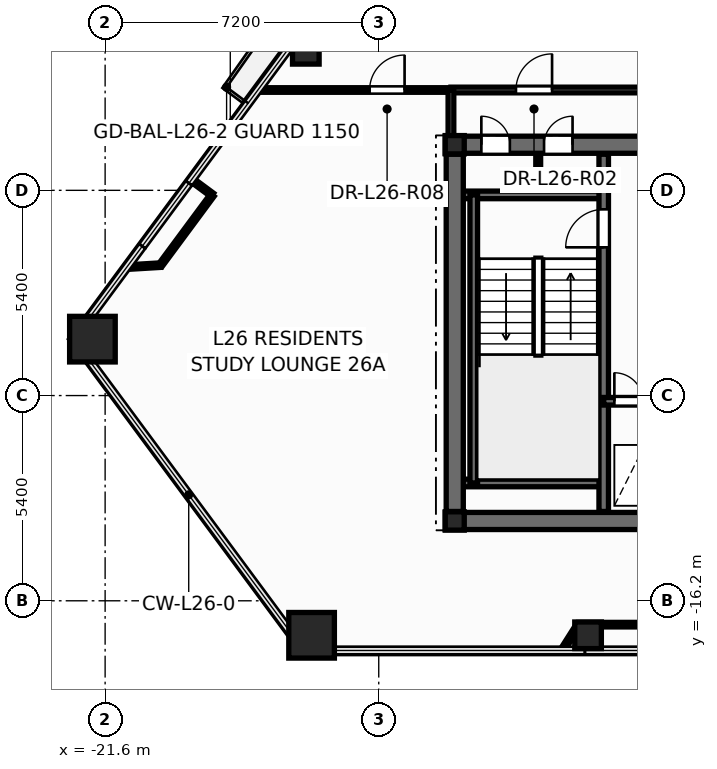
"""IFC4 building model, lengths in metres.
Left out: names, types, materials, properties, quantities, classifications, styles, units other than length and angle.
Written with IfcOpenShell. Run it as: python <this file> out.ifc"""

import sys

from ifc_helpers import new_model, si_unit, direction, frame, frame_2d, origin, origin_2d, place, context, subcontext, project, spatial, rectangle, hollow_rectangle, hollow_circle, i_section, extrude, element, fill, save


model = new_model("IFC4")
c1 = context("Model", 3, precision=1e-05, world=origin(), true_north=direction((0.0, 1.0)))
c2 = subcontext(c1, "Body", "Model", "MODEL_VIEW")
j1 = project(units=[si_unit("LENGTHUNIT", "METRE"), si_unit("PLANEANGLEUNIT", "RADIAN")], contexts=[c1])
p1 = place(None, origin())
s1 = spatial("IfcSite", under=j1, at=p1, CompositionType="ELEMENT")
p2 = place(p1, origin())
s2 = spatial("IfcBuilding", under=s1, at=p2, CompositionType="ELEMENT")
p3 = place(p2, frame((0.0, 0.0, 103.2)))
s3 = spatial("IfcBuildingStorey", under=s2, at=p3, CompositionType="ELEMENT", Elevation=103.2)
for number, where, z_axis, x_axis in (
    (1, (-21.934, -9.316, 0.0), (0.0, 0.0, 1.0), (1.0, 0.0, 0.0)),
    (2, (-16.167, -17.108, 0.0), (0.0, 0.0, 1.0), (1.0, 0.0, 0.0)),
):
    element("IfcColumn", number, at=place(p3, frame(where, z_axis=z_axis, x_axis=x_axis)), inside=s3, PredefinedType="COLUMN", context=c2, shape_type="SweptSolid", body=[
        extrude(hollow_rectangle(XDim=1.2, YDim=1.2, WallThickness=0.055, at=origin_2d()), origin(), (0.0, 0.0, 1.0), 3.6),
    ])
for number, where, z_axis, x_axis in (
    (3, (-8.892, -17.108, 0.0), (0.0, 0.0, 1.0), (1.0, 0.0, 0.0)),
    (4, (-16.319, -1.729, 0.0), (0.0, 0.0, 1.0), (1.0, 0.0, 0.0)),
):
    element("IfcColumn", number, at=place(p3, frame(where, z_axis=z_axis, x_axis=x_axis)), inside=s3, PredefinedType="COLUMN", context=c2, shape_type="SweptSolid", body=[
        extrude(hollow_circle(Radius=0.35, WallThickness=0.03, at=origin_2d()), origin(), (0.0, 0.0, 1.0), 3.6),
    ])
for number, where, z_axis, x_axis in (
    (5, (-12.4, -14.1, 0.0), (0.0, 0.0, 1.0), (1.0, 0.0, 0.0)),
    (6, (-12.4, -4.2, 0.0), (0.0, 0.0, 1.0), (1.0, 0.0, 0.0)),
):
    element("IfcColumn", number, at=place(p3, frame(where, z_axis=z_axis, x_axis=x_axis)), inside=s3, PredefinedType="COLUMN", context=c2, shape_type="SweptSolid", body=[
        extrude(i_section(OverallWidth=0.5, OverallDepth=0.482, WebThickness=0.04, FlangeThickness=0.045, at=origin_2d()), origin(), (0.0, 0.0, 1.0), 3.6),
    ])
p4 = place(p3, frame((-10.2, -5.52, 0.0), z_axis=(0.0, 0.0, 1.0), x_axis=(0.0, 1.0, 0.0)))
e7 = element("IfcWall", 7, at=p4, inside=s3, PredefinedType="PARTITIONING", context=c2, shape_type="SweptSolid", body=[
    extrude(rectangle(XDim=1.12, YDim=0.12, at=frame_2d((0.56, 0.0))), origin(), (0.0, 0.0, 1.0), 3.35),
])
p5 = place(p3, frame((-12.65, -14.1, 0.0), z_axis=(0.0, 0.0, 1.0), x_axis=(1.0, 0.0, 0.0)))
e8 = element("IfcWall", 8, at=p5, inside=s3, PredefinedType="SHEAR", context=c2, shape_type="SweptSolid", body=[
    extrude(rectangle(XDim=25.3, YDim=0.45, at=frame_2d((12.65, 0.0))), origin(), (0.0, 0.0, 1.0), 3.6),
])
p6 = place(p3, frame((-12.65, -4.2, 0.0), z_axis=(0.0, 0.0, 1.0), x_axis=(1.0, 0.0, 0.0)))
e9 = element("IfcWall", 9, at=p6, inside=s3, PredefinedType="SHEAR", context=c2, shape_type="SweptSolid", body=[
    extrude(rectangle(XDim=25.3, YDim=0.45, at=frame_2d((12.65, 0.0))), origin(), (0.0, 0.0, 1.0), 3.6),
])
p7 = place(p6, frame((0.95, 0.0, 0.0)))
e10 = element("IfcOpeningElement", 10, at=p7, cuts=e9, PredefinedType="OPENING", context=c2, shape_type="SweptSolid", body=[
    extrude(rectangle(XDim=0.756, YDim=2.054, at=frame_2d((0.375, 1.027))), frame((0.0, 0.235, 0.0), z_axis=(0.0, -1.0, 0.0), x_axis=(1.0, 0.0, 0.0)), (0.0, 0.0, 1.0), 0.47),
])
p8 = place(p6, frame((2.6, 0.0, 0.0)))
e11 = element("IfcOpeningElement", 11, at=p8, cuts=e9, PredefinedType="OPENING", context=c2, shape_type="SweptSolid", body=[
    extrude(rectangle(XDim=0.756, YDim=2.054, at=frame_2d((0.375, 1.027))), frame((0.0, 0.235, 0.0), z_axis=(0.0, -1.0, 0.0), x_axis=(1.0, 0.0, 0.0)), (0.0, 0.0, 1.0), 0.47),
])
p9 = place(p6, frame((21.85, 0.0, 0.0)))
e12 = element("IfcOpeningElement", 12, at=p9, cuts=e9, PredefinedType="OPENING", context=c2, shape_type="SweptSolid", body=[
    extrude(rectangle(XDim=0.756, YDim=2.054, at=frame_2d((0.375, 1.027))), frame((0.0, 0.235, 0.0), z_axis=(0.0, -1.0, 0.0), x_axis=(1.0, 0.0, 0.0)), (0.0, 0.0, 1.0), 0.47),
])
p10 = place(p6, frame((23.5, 0.0, 0.0)))
e13 = element("IfcOpeningElement", 13, at=p10, cuts=e9, PredefinedType="OPENING", context=c2, shape_type="SweptSolid", body=[
    extrude(rectangle(XDim=0.756, YDim=2.054, at=frame_2d((0.375, 1.027))), frame((0.0, 0.235, 0.0), z_axis=(0.0, -1.0, 0.0), x_axis=(1.0, 0.0, 0.0)), (0.0, 0.0, 1.0), 0.47),
])
p11 = place(p6, frame((5.85, 0.0, 0.0)))
e14 = element("IfcOpeningElement", 14, at=p11, cuts=e9, PredefinedType="OPENING", context=c2, shape_type="SweptSolid", body=[
    extrude(rectangle(XDim=1.006, YDim=2.104, at=frame_2d((0.5, 1.052))), frame((0.0, 0.235, 0.0), z_axis=(0.0, -1.0, 0.0), x_axis=(1.0, 0.0, 0.0)), (0.0, 0.0, 1.0), 0.47),
])
p12 = place(p6, frame((10.35, 0.0, 0.0)))
e15 = element("IfcOpeningElement", 15, at=p12, cuts=e9, PredefinedType="OPENING", context=c2, shape_type="SweptSolid", body=[
    extrude(rectangle(XDim=1.406, YDim=2.154, at=frame_2d((0.7, 1.077))), frame((0.0, 0.235, 0.0), z_axis=(0.0, -1.0, 0.0), x_axis=(1.0, 0.0, 0.0)), (0.0, 0.0, 1.0), 0.47),
])
p13 = place(p6, frame((18.45, 0.0, 0.0)))
e16 = element("IfcOpeningElement", 16, at=p13, cuts=e9, PredefinedType="OPENING", context=c2, shape_type="SweptSolid", body=[
    extrude(rectangle(XDim=1.006, YDim=2.104, at=frame_2d((0.5, 1.052))), frame((0.0, 0.235, 0.0), z_axis=(0.0, -1.0, 0.0), x_axis=(1.0, 0.0, 0.0)), (0.0, 0.0, 1.0), 0.47),
])
for number, where, z_axis, x_axis in (
    (17, (-12.35, -5.52, 0.0), (0.0, 0.0, 1.0), (1.0, 0.0, 0.0)),
    (18, (-12.35, -13.1, 0.0), (0.0, 0.0, 1.0), (1.0, 0.0, 0.0)),
):
    element("IfcWall", number, at=place(p3, frame(where, z_axis=z_axis, x_axis=x_axis)), inside=s3, PredefinedType="SOLIDWALL", context=c2, shape_type="SweptSolid", body=[
        extrude(rectangle(XDim=3.87, YDim=0.2, at=frame_2d((1.935, 0.0))), origin(), (0.0, 0.0, 1.0), 3.6),
    ])
p14 = place(p3, frame((-11.9, -13.1, 0.0), z_axis=(0.0, 0.0, 1.0), x_axis=(0.0, 1.0, 0.0)))
e19 = element("IfcWall", 19, at=p14, inside=s3, PredefinedType="SOLIDWALL", context=c2, shape_type="SweptSolid", body=[
    extrude(rectangle(XDim=7.58, YDim=0.2, at=frame_2d((3.79, 0.0))), origin(), (0.0, 0.0, 1.0), 3.6),
])
p15 = place(p3, frame((-8.48, -13.85, 0.0), z_axis=(0.0, 0.0, 1.0), x_axis=(0.0, 1.0, 0.0)))
e20 = element("IfcWall", 20, at=p15, inside=s3, PredefinedType="SHEAR", context=c2, shape_type="SweptSolid", body=[
    extrude(rectangle(XDim=9.4, YDim=0.25, at=frame_2d((4.7, 0.0))), origin(), (0.0, 0.0, 1.0), 3.6),
])
p16 = place(p15, frame((6.95, 0.0, 0.0)))
e21 = element("IfcOpeningElement", 21, at=p16, cuts=e20, PredefinedType="OPENING", context=c2, shape_type="SweptSolid", body=[
    extrude(rectangle(XDim=1.006, YDim=2.104, at=frame_2d((0.5, 1.052))), frame((0.0, 0.135, 0.0), z_axis=(0.0, -1.0, 0.0), x_axis=(1.0, 0.0, 0.0)), (0.0, 0.0, 1.0), 0.27),
])
p17 = place(p3, frame((-8.48, -10.95, 0.0), z_axis=(0.0, 0.0, 1.0), x_axis=(1.0, 0.0, 0.0)))
e22 = element("IfcWall", 22, at=p17, inside=s3, PredefinedType="SOLIDWALL", context=c2, shape_type="SweptSolid", body=[
    extrude(rectangle(XDim=3.36, YDim=0.2, at=frame_2d((1.68, 0.0))), origin(), (0.0, 0.0, 1.0), 3.6),
])
p18 = place(p17, frame((0.28, 0.0, 0.0)))
e23 = element("IfcOpeningElement", 23, at=p18, cuts=e22, PredefinedType="OPENING", context=c2, shape_type="SweptSolid", body=[
    extrude(rectangle(XDim=0.756, YDim=2.054, at=frame_2d((0.375, 1.027))), frame((0.0, 0.11, 0.0), z_axis=(0.0, -1.0, 0.0), x_axis=(1.0, 0.0, 0.0)), (0.0, 0.0, 1.0), 0.22),
])
p19 = place(p17, frame((1.85, 0.0, 0.0)))
e24 = element("IfcOpeningElement", 24, at=p19, cuts=e22, PredefinedType="OPENING", context=c2, shape_type="SweptSolid", body=[
    extrude(rectangle(XDim=1.106, YDim=2.104, at=frame_2d((0.55, 1.052))), frame((0.0, 0.11, 0.0), z_axis=(0.0, -1.0, 0.0), x_axis=(1.0, 0.0, 0.0)), (0.0, 0.0, 1.0), 0.22),
])
p20 = place(p3, frame((-12.4, -13.85, 0.0), z_axis=(0.0, 0.0, 1.0), x_axis=(0.0, 1.0, 0.0)))
e25 = element("IfcWall", 25, at=p20, inside=s3, PredefinedType="SHEAR", context=c2, shape_type="SweptSolid", body=[
    extrude(rectangle(XDim=9.4, YDim=0.45, at=frame_2d((4.7, 0.0))), origin(), (0.0, 0.0, 1.0), 3.6),
])
p21 = place(p3, frame((-12.5, -2.76, 0.0), z_axis=(0.0, 0.0, 1.0), x_axis=(1.0, 0.0, 0.0)))
e26 = element("IfcWall", 26, at=p21, inside=s3, PredefinedType="PARTITIONING", context=c2, shape_type="SweptSolid", body=[
    extrude(rectangle(XDim=6.238, YDim=0.15, at=frame_2d((3.119, 0.0))), origin(), (0.0, 0.0, 1.0), 2.325),
])
p22 = place(p21, frame((1.711, 0.0, 0.0)))
e27 = element("IfcOpeningElement", 27, at=p22, cuts=e26, PredefinedType="OPENING", context=c2, shape_type="SweptSolid", body=[
    extrude(rectangle(XDim=0.956, YDim=2.104, at=frame_2d((0.475, 1.052))), frame((0.0, 0.085, 0.0), z_axis=(0.0, -1.0, 0.0), x_axis=(1.0, 0.0, 0.0)), (0.0, 0.0, 1.0), 0.17),
])
p23 = place(p3, frame((-17.58, -2.76, 0.0), z_axis=(0.0, 0.0, 1.0), x_axis=(1.0, 0.0, 0.0)))
e28 = element("IfcWall", 28, at=p23, inside=s3, PredefinedType="PARTITIONING", context=c2, shape_type="SweptSolid", body=[
    extrude(rectangle(XDim=5.14, YDim=0.12, at=frame_2d((2.57, 0.0))), origin(), (0.0, 0.0, 1.0), 2.713),
])
p24 = place(p23, frame((2.94, 0.0, 0.0)))
e29 = element("IfcOpeningElement", 29, at=p24, cuts=e28, PredefinedType="OPENING", context=c2, shape_type="SweptSolid", body=[
    extrude(rectangle(XDim=0.926, YDim=2.104, at=frame_2d((0.46, 1.052))), frame((0.0, 0.07, 0.0), z_axis=(0.0, -1.0, 0.0), x_axis=(1.0, 0.0, 0.0)), (0.0, 0.0, 1.0), 0.14),
])
p25 = place(p3, frame((-9.141, -16.828, 0.0), z_axis=(0.0, 0.0, 1.0), x_axis=(1.0, 0.0, 0.0)))
e30 = element("IfcWall", 30, at=p25, inside=s3, PredefinedType="PARTITIONING", context=c2, shape_type="SweptSolid", body=[
    extrude(rectangle(XDim=3.569, YDim=0.12, at=frame_2d((1.784, 0.0))), origin(), (0.0, 0.0, 1.0), 2.713),
])
p26 = place(p3, frame((-18.779, -5.524, 0.0), z_axis=(0.0, 0.0, 1.0), x_axis=(-0.594914508596, -0.803788981924, 0.0)))
e31 = element("IfcWall", 31, at=p26, inside=s3, PredefinedType="PARTITIONING", context=c2, shape_type="SweptSolid", body=[
    extrude(rectangle(XDim=2.294, YDim=0.12, at=frame_2d((1.147, 0.0))), origin(), (0.0, 0.0, 1.0), 3.35),
])
p27 = place(p3, frame((-12.5, -4.24, 0.0), z_axis=(0.0, 0.0, 1.0), x_axis=(0.0, 1.0, 0.0)))
e32 = element("IfcWall", 32, at=p27, inside=s3, PredefinedType="PARTITIONING", context=c2, shape_type="SweptSolid", body=[
    extrude(rectangle(XDim=1.48, YDim=0.15, at=frame_2d((0.74, 0.0))), origin(), (0.0, 0.0, 1.0), 2.325),
])
p28 = place(p3, frame((-20.144, -7.368, 0.0), z_axis=(0.0, 0.0, 1.0), x_axis=(-0.998195482696, -0.060048133402, 0.0)))
e33 = element("IfcWall", 33, at=p28, inside=s3, PredefinedType="PARTITIONING", context=c2, shape_type="SweptSolid", body=[
    extrude(rectangle(XDim=0.874, YDim=0.12, at=frame_2d((0.437, 0.0))), origin(), (0.0, 0.0, 1.0), 2.713),
])
p29 = place(p3, frame((-9.566, -17.498, 0.0), z_axis=(0.0, 0.0, 1.0), x_axis=(0.535959408162, 0.844243752007, 0.0)))
e34 = element("IfcWall", 34, at=p29, inside=s3, PredefinedType="PARTITIONING", context=c2, shape_type="SweptSolid", body=[
    extrude(rectangle(XDim=0.793, YDim=0.12, at=frame_2d((0.397, 0.0))), origin(), (0.0, 0.0, 1.0), 2.713),
])
p30 = place(p3, frame((-19.318, -5.125, 0.0), z_axis=(0.0, 0.0, 1.0), x_axis=(0.803744328022, -0.594974835748, 0.0)))
e35 = element("IfcWall", 35, at=p30, inside=s3, PredefinedType="PARTITIONING", context=c2, shape_type="SweptSolid", body=[
    extrude(rectangle(XDim=0.67, YDim=0.12, at=frame_2d((0.335, 0.0))), origin(), (0.0, 0.0, 1.0), 2.713),
])
p31 = place(p16, origin())
e36 = element("IfcDoor", 36, at=p31, inside=s3, OperationType="SINGLE_SWING_LEFT", PredefinedType="DOOR", context=c2, shape_type="SweptSolid", body=[
    extrude(rectangle(XDim=1.0, YDim=2.1, at=frame_2d((0.5, 1.05))), frame((0.0, 0.025, 0.0), z_axis=(0.0, -1.0, 0.0), x_axis=(1.0, 0.0, 0.0)), (0.0, 0.0, 1.0), 0.05),
])
fill(e21, e36)
p32 = place(p18, origin())
e37 = element("IfcDoor", 37, at=p32, inside=s3, OperationType="SINGLE_SWING_LEFT", PredefinedType="DOOR", context=c2, shape_type="SweptSolid", body=[
    extrude(rectangle(XDim=0.75, YDim=2.05, at=frame_2d((0.375, 1.025))), frame((0.0, 0.025, 0.0), z_axis=(0.0, -1.0, 0.0), x_axis=(1.0, 0.0, 0.0)), (0.0, 0.0, 1.0), 0.05),
])
fill(e23, e37)
p33 = place(p7, origin())
e38 = element("IfcDoor", 38, at=p33, inside=s3, OperationType="SINGLE_SWING_LEFT", PredefinedType="DOOR", context=c2, shape_type="SweptSolid", body=[
    extrude(rectangle(XDim=0.75, YDim=2.05, at=frame_2d((0.375, 1.025))), frame((0.0, 0.025, 0.0), z_axis=(0.0, -1.0, 0.0), x_axis=(1.0, 0.0, 0.0)), (0.0, 0.0, 1.0), 0.05),
])
fill(e10, e38)
p34 = place(p8, origin())
e39 = element("IfcDoor", 39, at=p34, inside=s3, OperationType="SINGLE_SWING_RIGHT", PredefinedType="DOOR", context=c2, shape_type="SweptSolid", body=[
    extrude(rectangle(XDim=0.75, YDim=2.05, at=frame_2d((0.375, 1.025))), frame((0.0, 0.025, 0.0), z_axis=(0.0, -1.0, 0.0), x_axis=(1.0, 0.0, 0.0)), (0.0, 0.0, 1.0), 0.05),
])
fill(e11, e39)
p35 = place(p22, origin())
e40 = element("IfcDoor", 40, at=p35, inside=s3, OperationType="SINGLE_SWING_RIGHT", PredefinedType="DOOR", context=c2, shape_type="SweptSolid", body=[
    extrude(rectangle(XDim=0.95, YDim=2.1, at=frame_2d((0.475, 1.05))), frame((0.0, 0.025, 0.0), z_axis=(0.0, -1.0, 0.0), x_axis=(1.0, 0.0, 0.0)), (0.0, 0.0, 1.0), 0.05),
])
fill(e27, e40)
p36 = place(p24, origin())
e41 = element("IfcDoor", 41, at=p36, inside=s3, OperationType="SINGLE_SWING_RIGHT", PredefinedType="DOOR", context=c2, shape_type="SweptSolid", body=[
    extrude(rectangle(XDim=0.92, YDim=2.1, at=frame_2d((0.46, 1.05))), frame((0.0, 0.025, 0.0), z_axis=(0.0, -1.0, 0.0), x_axis=(1.0, 0.0, 0.0)), (0.0, 0.0, 1.0), 0.05),
])
fill(e29, e41)
save(model, sys.argv[1])
